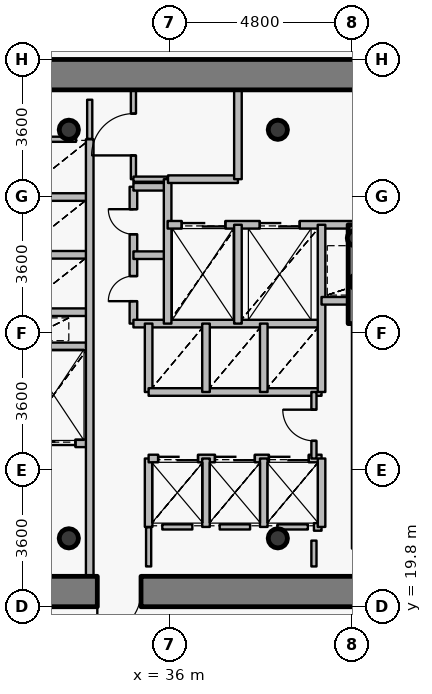
"""IFC4 building model, lengths in metres.
Left out: names, types, materials, properties, quantities, classifications, styles, units other than length and angle.
Written with IfcOpenShell. Run it as: python <this file> out.ifc"""

import sys

from ifc_helpers import new_model, si_unit, direction, frame, frame_2d, origin, origin_2d, place, context, subcontext, project, spatial, rectangle, hollow_circle, extrude, source, transform, mapped, element, fill, save


model = new_model("IFC4")
c1 = context("Model", 3, precision=1e-05, world=origin(), true_north=direction((0.0, 1.0)))
c2 = subcontext(c1, "Body", "Model", "MODEL_VIEW")
j1 = project(units=[si_unit("LENGTHUNIT", "METRE"), si_unit("PLANEANGLEUNIT", "RADIAN")], contexts=[c1])
p1 = place(None, origin())
s1 = spatial("IfcSite", under=j1, at=p1, CompositionType="ELEMENT")
p2 = place(p1, origin())
s2 = spatial("IfcBuilding", under=s1, at=p2, CompositionType="ELEMENT")
p3 = place(p2, frame((0.0, 0.0, 127.2)))
s3 = spatial("IfcBuildingStorey", under=s2, at=p3, CompositionType="ELEMENT", Elevation=127.2)
for number, where, z_axis, x_axis in (
    (1, (33.35, 21.6, 0.0), (0.0, 0.0, 1.0), (1.0, 0.0, 0.0)),
    (2, (38.85, 21.6, 0.0), (0.0, 0.0, 1.0), (1.0, 0.0, 0.0)),
    (3, (38.85, 32.35, 0.0), (0.0, 0.0, 1.0), (1.0, 0.0, 0.0)),
    (4, (33.35, 32.35, 0.0), (0.0, 0.0, 1.0), (1.0, 0.0, 0.0)),
):
    element("IfcColumn", number, at=place(p3, frame(where, z_axis=z_axis, x_axis=x_axis)), inside=s3, PredefinedType="COLUMN", context=c2, shape_type="SweptSolid", body=[
        extrude(hollow_circle(Radius=0.254, WallThickness=0.02, at=origin_2d()), origin(), (0.0, 0.0, 1.0), 3.75),
    ])
for number, where, z_axis, x_axis in (
    (5, (40.95, 28.35, 0.0), (0.0, 0.0, 1.0), (1.0, 0.0, 0.0)),
    (6, (40.88, 29.5, 0.0), (0.0, 0.0, 1.0), (1.0, 0.0, 0.0)),
):
    element("IfcColumn", number, at=place(p3, frame(where, z_axis=z_axis, x_axis=x_axis)), inside=s3, PredefinedType="COLUMN", context=c2, shape_type="SweptSolid", body=[
        extrude(hollow_circle(Radius=0.203, WallThickness=0.016, at=origin_2d()), origin(), (0.0, 0.0, 1.0), 3.75),
    ])
p4 = place(p3, frame((26.6, 33.8, 0.0), z_axis=(0.0, 0.0, 1.0), x_axis=(1.0, 0.0, 0.0)))
e7 = element("IfcWall", 7, at=p4, inside=s3, PredefinedType="SHEAR", context=c2, shape_type="SweptSolid", body=[
    extrude(rectangle(XDim=18.8, YDim=0.8, at=frame_2d((9.4, 0.0))), origin(), (0.0, 0.0, 1.0), 2.95),
])
p5 = place(p3, frame((45.4, 20.2, 0.0), z_axis=(0.0, 0.0, 1.0), x_axis=(-1.0, 0.0, 0.0)))
e8 = element("IfcWall", 8, at=p5, inside=s3, PredefinedType="SHEAR", context=c2, shape_type="SweptSolid", body=[
    extrude(rectangle(XDim=18.8, YDim=0.8, at=frame_2d((9.4, 0.0))), origin(), (0.0, 0.0, 1.0), 2.95),
])
p6 = place(p5, frame((10.15, 0.0, 0.0)))
e9 = element("IfcOpeningElement", 9, at=p6, cuts=e8, PredefinedType="OPENING", context=c2, shape_type="SweptSolid", body=[
    extrude(rectangle(XDim=1.15, YDim=2.15, at=origin_2d()), frame((0.575, 0.41, 1.075), z_axis=(0.0, -1.0, 0.0), x_axis=(1.0, 0.0, 0.0)), (0.0, 0.0, 1.0), 0.82),
])
p7 = place(p3, frame((40.9, 27.25, 0.0), z_axis=(0.0, 0.0, 1.0), x_axis=(0.0, 1.0, 0.0)))
e10 = element("IfcWall", 10, at=p7, inside=s3, PredefinedType="SHEAR", context=c2, shape_type="SweptSolid", body=[
    extrude(rectangle(XDim=2.6, YDim=0.4, at=frame_2d((1.3, 0.0))), origin(), (0.0, 0.0, 1.0), 3.1),
])
p8 = place(p3, frame((32.0, 24.1, 0.0), z_axis=(0.0, 0.0, 1.0), x_axis=(1.0, 0.0, 0.0)))
e11 = element("IfcWall", 11, at=p8, inside=s3, PredefinedType="PARTITIONING", context=c2, shape_type="SweptSolid", body=[
    extrude(rectangle(XDim=1.9, YDim=0.2, at=frame_2d((0.95, 0.0))), origin(), (0.0, 0.0, 1.0), 3.085),
])
p9 = place(p8, frame((0.375, 0.0, 0.0)))
e12 = element("IfcOpeningElement", 12, at=p9, cuts=e11, PredefinedType="OPENING", context=c2, shape_type="SweptSolid", body=[
    extrude(rectangle(XDim=1.15, YDim=2.15, at=origin_2d()), frame((0.575, 0.11, 1.075), z_axis=(0.0, -1.0, 0.0), x_axis=(1.0, 0.0, 0.0)), (0.0, 0.0, 1.0), 0.22),
])
for number, where, z_axis, x_axis in (
    (13, (32.0, 26.65, 0.0), (0.0, 0.0, 1.0), (1.0, 0.0, 0.0)),
    (14, (32.0, 27.55, 0.0), (0.0, 0.0, 1.0), (1.0, 0.0, 0.0)),
    (15, (32.0, 29.06, 0.0), (0.0, 0.0, 1.0), (1.0, 0.0, 0.0)),
    (16, (32.0, 30.58, 0.0), (0.0, 0.0, 1.0), (1.0, 0.0, 0.0)),
):
    element("IfcWall", number, at=place(p3, frame(where, z_axis=z_axis, x_axis=x_axis)), inside=s3, PredefinedType="PARTITIONING", context=c2, shape_type="SweptSolid", body=[
        extrude(rectangle(XDim=1.9, YDim=0.2, at=frame_2d((0.95, 0.0))), origin(), (0.0, 0.0, 1.0), 3.085),
    ])
p10 = place(p3, frame((33.9, 20.6, 0.0), z_axis=(0.0, 0.0, 1.0), x_axis=(0.0, 1.0, 0.0)))
e17 = element("IfcWall", 17, at=p10, inside=s3, PredefinedType="PARTITIONING", context=c2, shape_type="SweptSolid", body=[
    extrude(rectangle(XDim=11.5, YDim=0.2, at=frame_2d((5.75, 0.0))), origin(), (0.0, 0.0, 1.0), 3.085),
])
p11 = place(p3, frame((35.05, 27.25, 0.0), z_axis=(0.0, 0.0, 1.0), x_axis=(0.0, 1.0, 0.0)))
e18 = element("IfcWall", 18, at=p11, inside=s3, PredefinedType="PARTITIONING", context=c2, shape_type="SweptSolid", body=[
    extrude(rectangle(XDim=3.6, YDim=0.2, at=frame_2d((1.8, 0.0))), origin(), (0.0, 0.0, 1.0), 3.5),
])
p12 = place(p11, frame((0.59, 0.0, 0.0)))
e19 = element("IfcOpeningElement", 19, at=p12, cuts=e18, PredefinedType="OPENING", context=c2, shape_type="SweptSolid", body=[
    extrude(rectangle(XDim=0.66, YDim=2.05, at=origin_2d()), frame((0.33, 0.11, 1.025), z_axis=(0.0, -1.0, 0.0), x_axis=(1.0, 0.0, 0.0)), (0.0, 0.0, 1.0), 0.22),
])
p13 = place(p11, frame((2.35, 0.0, 0.0)))
e20 = element("IfcOpeningElement", 20, at=p13, cuts=e18, PredefinedType="OPENING", context=c2, shape_type="SweptSolid", body=[
    extrude(rectangle(XDim=0.66, YDim=2.05, at=origin_2d()), frame((0.33, 0.11, 1.025), z_axis=(0.0, -1.0, 0.0), x_axis=(1.0, 0.0, 0.0)), (0.0, 0.0, 1.0), 0.22),
])
p14 = place(p3, frame((35.05, 27.25, 0.0), z_axis=(0.0, 0.0, 1.0), x_axis=(1.0, 0.0, 0.0)))
e21 = element("IfcWall", 21, at=p14, inside=s3, PredefinedType="PARTITIONING", context=c2, shape_type="SweptSolid", body=[
    extrude(rectangle(XDim=4.95, YDim=0.2, at=frame_2d((2.475, 0.0))), origin(), (0.0, 0.0, 1.0), 3.085),
])
for number, where, z_axis, x_axis in (
    (22, (35.05, 29.05, 0.0), (0.0, 0.0, 1.0), (1.0, 0.0, 0.0)),
    (23, (35.05, 30.85, 0.0), (0.0, 0.0, 1.0), (1.0, 0.0, 0.0)),
):
    element("IfcWall", number, at=place(p3, frame(where, z_axis=z_axis, x_axis=x_axis)), inside=s3, PredefinedType="PARTITIONING", context=c2, shape_type="SweptSolid", body=[
        extrude(rectangle(XDim=0.9, YDim=0.2, at=frame_2d((0.45, 0.0))), origin(), (0.0, 0.0, 1.0), 3.5),
    ])
p15 = place(p3, frame((35.05, 31.05, 0.0), z_axis=(0.0, 0.0, 1.0), x_axis=(0.0, 1.0, 0.0)))
e24 = element("IfcWall", 24, at=p15, inside=s3, PredefinedType="PARTITIONING", context=c2, shape_type="SweptSolid", body=[
    extrude(rectangle(XDim=2.35, YDim=0.135, at=frame_2d((1.175, 0.0))), origin(), (0.0, 0.0, 1.0), 3.085),
])
p16 = place(p15, frame((0.625, 0.0, 0.0)))
e25 = element("IfcOpeningElement", 25, at=p16, cuts=e24, PredefinedType="OPENING", context=c2, shape_type="SweptSolid", body=[
    extrude(rectangle(XDim=1.1, YDim=2.15, at=origin_2d()), frame((0.55, 0.078, 1.075), z_axis=(0.0, -1.0, 0.0), x_axis=(1.0, 0.0, 0.0)), (0.0, 0.0, 1.0), 0.155),
])
p17 = place(p3, frame((35.05, 31.05, 0.0), z_axis=(0.0, 0.0, 1.0), x_axis=(1.0, 0.0, 0.0)))
e26 = element("IfcWall", 26, at=p17, inside=s3, PredefinedType="PARTITIONING", context=c2, shape_type="SweptSolid", body=[
    extrude(rectangle(XDim=0.9, YDim=0.135, at=frame_2d((0.45, 0.0))), origin(), (0.0, 0.0, 1.0), 3.5),
])
p18 = place(p3, frame((35.45, 21.9, 0.0), z_axis=(0.0, 0.0, 1.0), x_axis=(0.0, 1.0, 0.0)))
e27 = element("IfcWall", 27, at=p18, inside=s3, PredefinedType="PARTITIONING", context=c2, shape_type="SweptSolid", body=[
    extrude(rectangle(XDim=1.8, YDim=0.2, at=frame_2d((0.9, 0.0))), origin(), (0.0, 0.0, 1.0), 3.5),
])
p19 = place(p3, frame((35.45, 23.7, 0.0), z_axis=(0.0, 0.0, 1.0), x_axis=(1.0, 0.0, 0.0)))
e28 = element("IfcWall", 28, at=p19, inside=s3, PredefinedType="PARTITIONING", context=c2, shape_type="SweptSolid", body=[
    extrude(rectangle(XDim=4.55, YDim=0.2, at=frame_2d((2.275, 0.0))), origin(), (0.0, 0.0, 1.0), 3.085),
])
p20 = place(p19, frame((0.25, 0.0, 0.0)))
e29 = element("IfcOpeningElement", 29, at=p20, cuts=e28, PredefinedType="OPENING", context=c2, shape_type="SweptSolid", body=[
    extrude(rectangle(XDim=1.05, YDim=2.15, at=origin_2d()), frame((0.525, 0.11, 1.075), z_axis=(0.0, -1.0, 0.0), x_axis=(1.0, 0.0, 0.0)), (0.0, 0.0, 1.0), 0.22),
])
p21 = place(p19, frame((1.745, 0.0, 0.0)))
e30 = element("IfcOpeningElement", 30, at=p21, cuts=e28, PredefinedType="OPENING", context=c2, shape_type="SweptSolid", body=[
    extrude(rectangle(XDim=1.05, YDim=2.15, at=origin_2d()), frame((0.525, 0.11, 1.075), z_axis=(0.0, -1.0, 0.0), x_axis=(1.0, 0.0, 0.0)), (0.0, 0.0, 1.0), 0.22),
])
p22 = place(p19, frame((3.165, 0.0, 0.0)))
e31 = element("IfcOpeningElement", 31, at=p22, cuts=e28, PredefinedType="OPENING", context=c2, shape_type="SweptSolid", body=[
    extrude(rectangle(XDim=1.05, YDim=2.15, at=origin_2d()), frame((0.525, 0.11, 1.075), z_axis=(0.0, -1.0, 0.0), x_axis=(1.0, 0.0, 0.0)), (0.0, 0.0, 1.0), 0.22),
])
p23 = place(p3, frame((35.45, 25.45, 0.0), z_axis=(0.0, 0.0, 1.0), x_axis=(0.0, 1.0, 0.0)))
e32 = element("IfcWall", 32, at=p23, inside=s3, PredefinedType="PARTITIONING", context=c2, shape_type="SweptSolid", body=[
    extrude(rectangle(XDim=1.8, YDim=0.2, at=frame_2d((0.9, 0.0))), origin(), (0.0, 0.0, 1.0), 3.5),
])
p24 = place(p3, frame((35.45, 25.45, 0.0), z_axis=(0.0, 0.0, 1.0), x_axis=(1.0, 0.0, 0.0)))
e33 = element("IfcWall", 33, at=p24, inside=s3, PredefinedType="PARTITIONING", context=c2, shape_type="SweptSolid", body=[
    extrude(rectangle(XDim=4.55, YDim=0.2, at=frame_2d((2.275, 0.0))), origin(), (0.0, 0.0, 1.0), 3.085),
])
p25 = place(p3, frame((35.95, 27.25, 0.0), z_axis=(0.0, 0.0, 1.0), x_axis=(0.0, 1.0, 0.0)))
e34 = element("IfcWall", 34, at=p25, inside=s3, PredefinedType="PARTITIONING", context=c2, shape_type="SweptSolid", body=[
    extrude(rectangle(XDim=3.8, YDim=0.2, at=frame_2d((1.9, 0.0))), origin(), (0.0, 0.0, 1.0), 3.5),
])
p26 = place(p3, frame((35.95, 29.85, 0.0), z_axis=(0.0, 0.0, 1.0), x_axis=(1.0, 0.0, 0.0)))
e35 = element("IfcWall", 35, at=p26, inside=s3, PredefinedType="PARTITIONING", context=c2, shape_type="SweptSolid", body=[
    extrude(rectangle(XDim=8.49, YDim=0.2, at=frame_2d((4.245, 0.0))), origin(), (0.0, 0.0, 1.0), 3.085),
])
p27 = place(p26, frame((6.1, 0.0, 0.0)))
e36 = element("IfcOpeningElement", 36, at=p27, cuts=e35, PredefinedType="OPENING", context=c2, shape_type="SweptSolid", body=[
    extrude(rectangle(XDim=1.2, YDim=2.15, at=origin_2d()), frame((0.6, 0.11, 1.075), z_axis=(0.0, -1.0, 0.0), x_axis=(1.0, 0.0, 0.0)), (0.0, 0.0, 1.0), 0.22),
])
p28 = place(p26, frame((0.37, 0.0, 0.0)))
e37 = element("IfcOpeningElement", 37, at=p28, cuts=e35, PredefinedType="OPENING", context=c2, shape_type="SweptSolid", body=[
    extrude(rectangle(XDim=1.15, YDim=2.15, at=origin_2d()), frame((0.575, 0.11, 1.075), z_axis=(0.0, -1.0, 0.0), x_axis=(1.0, 0.0, 0.0)), (0.0, 0.0, 1.0), 0.22),
])
p29 = place(p26, frame((2.425, 0.0, 0.0)))
e38 = element("IfcOpeningElement", 38, at=p29, cuts=e35, PredefinedType="OPENING", context=c2, shape_type="SweptSolid", body=[
    extrude(rectangle(XDim=1.05, YDim=2.15, at=origin_2d()), frame((0.525, 0.11, 1.075), z_axis=(0.0, -1.0, 0.0), x_axis=(1.0, 0.0, 0.0)), (0.0, 0.0, 1.0), 0.22),
])
p30 = place(p3, frame((35.96, 31.05, 0.0), z_axis=(0.0, 0.0, 1.0), x_axis=(1.0, 0.0, 0.0)))
e39 = element("IfcWall", 39, at=p30, inside=s3, PredefinedType="PARTITIONING", context=c2, shape_type="SweptSolid", body=[
    extrude(rectangle(XDim=1.84, YDim=0.2, at=frame_2d((0.92, 0.0))), origin(), (0.0, 0.0, 1.0), 3.5),
])
for number, where, z_axis, x_axis in (
    (40, (36.96, 21.9, 0.0), (0.0, 0.0, 1.0), (0.0, 1.0, 0.0)),
    (41, (36.96, 25.45, 0.0), (0.0, 0.0, 1.0), (0.0, 1.0, 0.0)),
):
    element("IfcWall", number, at=place(p3, frame(where, z_axis=z_axis, x_axis=x_axis)), inside=s3, PredefinedType="PARTITIONING", context=c2, shape_type="SweptSolid", body=[
        extrude(rectangle(XDim=1.8, YDim=0.2, at=frame_2d((0.9, 0.0))), origin(), (0.0, 0.0, 1.0), 3.5),
    ])
p31 = place(p3, frame((37.8, 27.25, 0.0), z_axis=(0.0, 0.0, 1.0), x_axis=(0.0, 1.0, 0.0)))
e42 = element("IfcWall", 42, at=p31, inside=s3, PredefinedType="PARTITIONING", context=c2, shape_type="SweptSolid", body=[
    extrude(rectangle(XDim=2.6, YDim=0.2, at=frame_2d((1.3, 0.0))), origin(), (0.0, 0.0, 1.0), 3.5),
])
p32 = place(p3, frame((37.8, 31.05, 0.0), z_axis=(0.0, 0.0, 1.0), x_axis=(0.0, 1.0, 0.0)))
e43 = element("IfcWall", 43, at=p32, inside=s3, PredefinedType="PARTITIONING", context=c2, shape_type="SweptSolid", body=[
    extrude(rectangle(XDim=2.35, YDim=0.2, at=frame_2d((1.175, 0.0))), origin(), (0.0, 0.0, 1.0), 3.085),
])
for number, where, z_axis, x_axis in (
    (44, (38.48, 21.9, 0.0), (0.0, 0.0, 1.0), (0.0, 1.0, 0.0)),
    (45, (38.48, 25.45, 0.0), (0.0, 0.0, 1.0), (0.0, 1.0, 0.0)),
):
    element("IfcWall", number, at=place(p3, frame(where, z_axis=z_axis, x_axis=x_axis)), inside=s3, PredefinedType="PARTITIONING", context=c2, shape_type="SweptSolid", body=[
        extrude(rectangle(XDim=1.8, YDim=0.2, at=frame_2d((0.9, 0.0))), origin(), (0.0, 0.0, 1.0), 3.5),
    ])
p33 = place(p3, frame((39.8, 21.9, 0.0), z_axis=(0.0, 0.0, 1.0), x_axis=(1.0, 0.0, 0.0)))
e46 = element("IfcWall", 46, at=p33, inside=s3, PredefinedType="PARTITIONING", context=c2, shape_type="SweptSolid", body=[
    extrude(rectangle(XDim=0.2, YDim=0.2, at=frame_2d((0.1, 0.0))), origin(), (0.0, 0.0, 1.0), 3.5),
])
p34 = place(p3, frame((39.8, 23.7, 0.0), z_axis=(0.0, 0.0, 1.0), x_axis=(0.0, 1.0, 0.0)))
e47 = element("IfcWall", 47, at=p34, inside=s3, PredefinedType="PARTITIONING", context=c2, shape_type="SweptSolid", body=[
    extrude(rectangle(XDim=1.75, YDim=0.135, at=frame_2d((0.875, 0.0))), origin(), (0.0, 0.0, 1.0), 3.5),
])
p35 = place(p34, frame((0.465, 0.0, 0.0)))
e48 = element("IfcOpeningElement", 48, at=p35, cuts=e47, PredefinedType="OPENING", context=c2, shape_type="SweptSolid", body=[
    extrude(rectangle(XDim=0.82, YDim=2.1, at=origin_2d()), frame((0.41, 0.078, 1.05), z_axis=(0.0, -1.0, 0.0), x_axis=(1.0, 0.0, 0.0)), (0.0, 0.0, 1.0), 0.155),
])
p36 = place(p3, frame((40.0, 21.9, 0.0), z_axis=(0.0, 0.0, 1.0), x_axis=(0.0, 1.0, 0.0)))
e49 = element("IfcWall", 49, at=p36, inside=s3, PredefinedType="PARTITIONING", context=c2, shape_type="SweptSolid", body=[
    extrude(rectangle(XDim=1.8, YDim=0.2, at=frame_2d((0.9, 0.0))), origin(), (0.0, 0.0, 1.0), 3.5),
])
p37 = place(p3, frame((40.0, 25.45, 0.0), z_axis=(0.0, 0.0, 1.0), x_axis=(0.0, 1.0, 0.0)))
e50 = element("IfcWall", 50, at=p37, inside=s3, PredefinedType="PARTITIONING", context=c2, shape_type="SweptSolid", body=[
    extrude(rectangle(XDim=4.4, YDim=0.2, at=frame_2d((2.2, 0.0))), origin(), (0.0, 0.0, 1.0), 3.5),
])
p38 = place(p3, frame((40.0, 27.85, 0.0), z_axis=(0.0, 0.0, 1.0), x_axis=(1.0, 0.0, 0.0)))
e51 = element("IfcWall", 51, at=p38, inside=s3, PredefinedType="PARTITIONING", context=c2, shape_type="SweptSolid", body=[
    extrude(rectangle(XDim=0.9, YDim=0.2, at=frame_2d((0.45, 0.0))), origin(), (0.0, 0.0, 1.0), 3.5),
])
p39 = place(p3, frame((40.9, 21.33, 0.0), z_axis=(0.0, 0.0, 1.0), x_axis=(0.0, 1.0, 0.0)))
e52 = element("IfcWall", 52, at=p39, inside=s3, PredefinedType="PARTITIONING", context=c2, shape_type="SweptSolid", body=[
    extrude(rectangle(XDim=5.91, YDim=0.2, at=frame_2d((2.955, 0.0))), origin(), (0.0, 0.0, 1.0), 3.035),
])
p40 = place(p3, frame((36.6, 21.9, 0.0), z_axis=(0.0, 0.0, 1.0), x_axis=(-1.0, 0.0, 0.0)))
e53 = element("IfcWall", 53, at=p40, inside=s3, PredefinedType="PARTITIONING", context=c2, shape_type="SweptSolid", body=[
    extrude(rectangle(XDim=0.79, YDim=0.135, at=frame_2d((0.395, 0.0))), origin(), (0.0, 0.0, 1.0), 3.5),
])
p41 = place(p3, frame((38.12, 21.9, 0.0), z_axis=(0.0, 0.0, 1.0), x_axis=(-1.0, 0.0, 0.0)))
e54 = element("IfcWall", 54, at=p41, inside=s3, PredefinedType="PARTITIONING", context=c2, shape_type="SweptSolid", body=[
    extrude(rectangle(XDim=0.8, YDim=0.135, at=frame_2d((0.4, 0.0))), origin(), (0.0, 0.0, 1.0), 3.5),
])
p42 = place(p3, frame((39.64, 21.9, 0.0), z_axis=(0.0, 0.0, 1.0), x_axis=(-1.0, 0.0, 0.0)))
e55 = element("IfcWall", 55, at=p42, inside=s3, PredefinedType="PARTITIONING", context=c2, shape_type="SweptSolid", body=[
    extrude(rectangle(XDim=0.8, YDim=0.135, at=frame_2d((0.4, 0.0))), origin(), (0.0, 0.0, 1.0), 3.085),
])
p43 = place(p3, frame((32.36, 32.1, 0.0), z_axis=(0.0, 0.0, 1.0), x_axis=(1.0, 0.0, 0.0)))
e56 = element("IfcWall", 56, at=p43, inside=s3, PredefinedType="PARTITIONING", context=c2, shape_type="SweptSolid", body=[
    extrude(rectangle(XDim=1.18, YDim=0.135, at=frame_2d((0.59, 0.0))), origin(), (0.0, 0.0, 1.0), 3.085),
])
p44 = place(p3, frame((39.8, 20.86, 0.0), z_axis=(0.0, 0.0, 1.0), x_axis=(0.0, 1.0, 0.0)))
e57 = element("IfcWall", 57, at=p44, inside=s3, PredefinedType="PARTITIONING", context=c2, shape_type="SweptSolid", body=[
    extrude(rectangle(XDim=0.68, YDim=0.135, at=frame_2d((0.34, 0.0))), origin(), (0.0, 0.0, 1.0), 3.035),
])
for number, where, z_axis, x_axis in (
    (58, (35.45, 21.89, 0.0), (0.0, 0.0, 1.0), (0.0, -1.0, 0.0)),
    (59, (33.9, 32.11, 0.0), (0.0, 0.0, 1.0), (0.0, 1.0, 0.0)),
):
    element("IfcWall", number, at=place(p3, frame(where, z_axis=z_axis, x_axis=x_axis)), inside=s3, PredefinedType="PARTITIONING", context=c2, shape_type="SweptSolid", body=[
        extrude(rectangle(XDim=1.03, YDim=0.135, at=frame_2d((0.515, 0.0))), origin(), (0.0, 0.0, 1.0), 3.085),
    ])
m1 = source(origin(), c2, "Body", "SweptSolid", [
    extrude(rectangle(XDim=1.15, YDim=2.15, at=origin_2d()), frame((0.575, 0.025, 1.075), z_axis=(0.0, -1.0, 0.0), x_axis=(1.0, 0.0, 0.0)), (0.0, 0.0, 1.0), 0.05),
])
p45 = place(p6, origin())
e60 = element("IfcDoor", 60, at=p45, inside=s3, OperationType="SINGLE_SWING_RIGHT", PredefinedType="DOOR", context=c2, shape_type="MappedRepresentation", body=[
    mapped(m1, transform((0.0, 0.0, 0.0), x_axis=(1.0, 0.0, 0.0), y_axis=(0.0, 1.0, 0.0), z_axis=(0.0, 0.0, 1.0), scale=1.0)),
])
fill(e9, e60)
m2 = source(origin(), c2, "Body", "SweptSolid", [
    extrude(rectangle(XDim=1.15, YDim=2.15, at=origin_2d()), frame((0.575, 0.025, 1.075), z_axis=(0.0, -1.0, 0.0), x_axis=(1.0, 0.0, 0.0)), (0.0, 0.0, 1.0), 0.05),
])
p46 = place(p28, origin())
e61 = element("IfcDoor", 61, at=p46, inside=s3, OperationType="DOUBLE_DOOR_SLIDING", PredefinedType="USERDEFINED", context=c2, shape_type="MappedRepresentation", body=[
    mapped(m2, transform((0.0, 0.0, 0.0), x_axis=(1.0, 0.0, 0.0), y_axis=(0.0, 1.0, 0.0), z_axis=(0.0, 0.0, 1.0), scale=1.0)),
])
fill(e37, e61)
p47 = place(p9, origin())
e62 = element("IfcDoor", 62, at=p47, inside=s3, OperationType="DOUBLE_DOOR_SLIDING", PredefinedType="USERDEFINED", context=c2, shape_type="MappedRepresentation", body=[
    mapped(m2, transform((0.0, 0.0, 0.0), x_axis=(1.0, 0.0, 0.0), y_axis=(0.0, 1.0, 0.0), z_axis=(0.0, 0.0, 1.0), scale=1.0)),
])
fill(e12, e62)
m3 = source(origin(), c2, "Body", "SweptSolid", [
    extrude(rectangle(XDim=1.05, YDim=2.15, at=origin_2d()), frame((0.525, 0.025, 1.075), z_axis=(0.0, -1.0, 0.0), x_axis=(1.0, 0.0, 0.0)), (0.0, 0.0, 1.0), 0.05),
])
p48 = place(p29, origin())
e63 = element("IfcDoor", 63, at=p48, inside=s3, OperationType="DOUBLE_DOOR_SLIDING", PredefinedType="USERDEFINED", context=c2, shape_type="MappedRepresentation", body=[
    mapped(m3, transform((0.0, 0.0, 0.0), x_axis=(1.0, 0.0, 0.0), y_axis=(0.0, 1.0, 0.0), z_axis=(0.0, 0.0, 1.0), scale=1.0)),
])
fill(e38, e63)
p49 = place(p20, origin())
e64 = element("IfcDoor", 64, at=p49, inside=s3, OperationType="DOUBLE_DOOR_SLIDING", PredefinedType="USERDEFINED", context=c2, shape_type="MappedRepresentation", body=[
    mapped(m3, transform((0.0, 0.0, 0.0), x_axis=(1.0, 0.0, 0.0), y_axis=(0.0, 1.0, 0.0), z_axis=(0.0, 0.0, 1.0), scale=1.0)),
])
fill(e29, e64)
p50 = place(p21, origin())
e65 = element("IfcDoor", 65, at=p50, inside=s3, OperationType="DOUBLE_DOOR_SLIDING", PredefinedType="USERDEFINED", context=c2, shape_type="MappedRepresentation", body=[
    mapped(m3, transform((0.0, 0.0, 0.0), x_axis=(1.0, 0.0, 0.0), y_axis=(0.0, 1.0, 0.0), z_axis=(0.0, 0.0, 1.0), scale=1.0)),
])
fill(e30, e65)
p51 = place(p22, origin())
e66 = element("IfcDoor", 66, at=p51, inside=s3, OperationType="DOUBLE_DOOR_SLIDING", PredefinedType="USERDEFINED", context=c2, shape_type="MappedRepresentation", body=[
    mapped(m3, transform((0.0, 0.0, 0.0), x_axis=(1.0, 0.0, 0.0), y_axis=(0.0, 1.0, 0.0), z_axis=(0.0, 0.0, 1.0), scale=1.0)),
])
fill(e31, e66)
m4 = source(origin(), c2, "Body", "SweptSolid", [
    extrude(rectangle(XDim=0.66, YDim=2.05, at=origin_2d()), frame((0.33, 0.025, 1.025), z_axis=(0.0, -1.0, 0.0), x_axis=(1.0, 0.0, 0.0)), (0.0, 0.0, 1.0), 0.05),
])
p52 = place(p12, origin())
e67 = element("IfcDoor", 67, at=p52, inside=s3, OperationType="SINGLE_SWING_LEFT", PredefinedType="USERDEFINED", context=c2, shape_type="MappedRepresentation", body=[
    mapped(m4, transform((0.0, 0.0, 0.0), x_axis=(1.0, 0.0, 0.0), y_axis=(0.0, 1.0, 0.0), z_axis=(0.0, 0.0, 1.0), scale=1.0)),
])
fill(e19, e67)
p53 = place(p13, origin())
e68 = element("IfcDoor", 68, at=p53, inside=s3, OperationType="SINGLE_SWING_RIGHT", PredefinedType="USERDEFINED", context=c2, shape_type="MappedRepresentation", body=[
    mapped(m4, transform((0.0, 0.0, 0.0), x_axis=(1.0, 0.0, 0.0), y_axis=(0.0, 1.0, 0.0), z_axis=(0.0, 0.0, 1.0), scale=1.0)),
])
fill(e20, e68)
m5 = source(origin(), c2, "Body", "SweptSolid", [
    extrude(rectangle(XDim=1.1, YDim=2.15, at=origin_2d()), frame((0.55, 0.025, 1.075), z_axis=(0.0, -1.0, 0.0), x_axis=(1.0, 0.0, 0.0)), (0.0, 0.0, 1.0), 0.05),
])
p54 = place(p16, origin())
e69 = element("IfcDoor", 69, at=p54, inside=s3, OperationType="SINGLE_SWING_LEFT", PredefinedType="DOOR", context=c2, shape_type="MappedRepresentation", body=[
    mapped(m5, transform((0.0, 0.0, 0.0), x_axis=(1.0, 0.0, 0.0), y_axis=(0.0, 1.0, 0.0), z_axis=(0.0, 0.0, 1.0), scale=1.0)),
])
fill(e25, e69)
m6 = source(origin(), c2, "Body", "SweptSolid", [
    extrude(rectangle(XDim=0.82, YDim=2.1, at=origin_2d()), frame((0.41, 0.025, 1.05), z_axis=(0.0, -1.0, 0.0), x_axis=(1.0, 0.0, 0.0)), (0.0, 0.0, 1.0), 0.05),
])
p55 = place(p35, origin())
e70 = element("IfcDoor", 70, at=p55, inside=s3, OperationType="SINGLE_SWING_RIGHT", PredefinedType="DOOR", context=c2, shape_type="MappedRepresentation", body=[
    mapped(m6, transform((0.0, 0.0, 0.0), x_axis=(1.0, 0.0, 0.0), y_axis=(0.0, 1.0, 0.0), z_axis=(0.0, 0.0, 1.0), scale=1.0)),
])
fill(e48, e70)
save(model, sys.argv[1])
